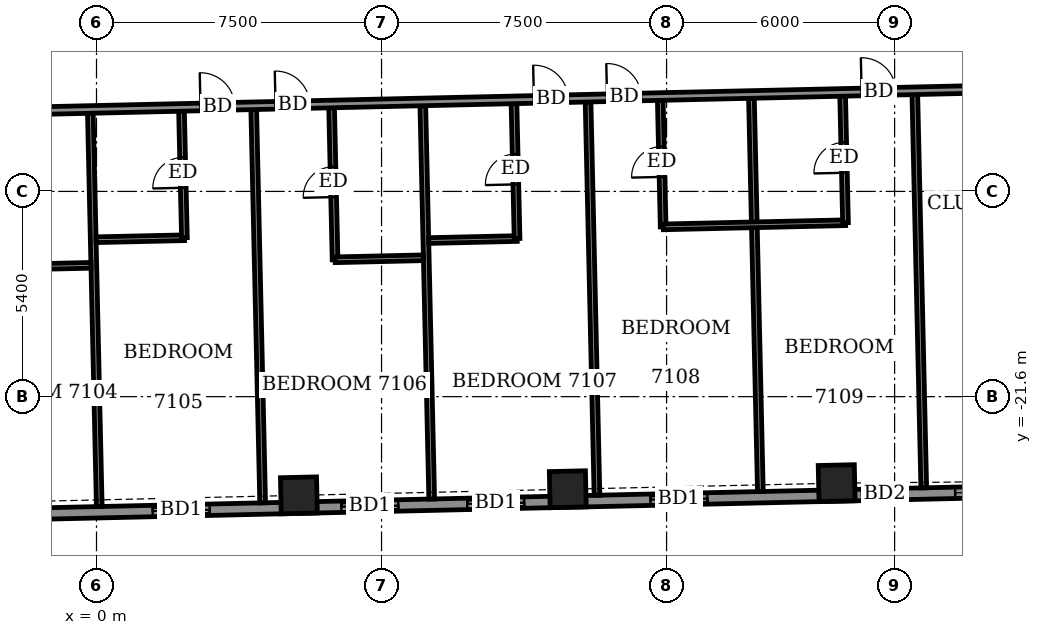
"""IFC4 building model, lengths in metres.
Left out: names, types, materials, properties, quantities, classifications, styles, units other than length and angle.
Written with IfcOpenShell. Run it as: python <this file> out.ifc"""

import sys

from ifc_helpers import new_model, si_unit, direction, frame, frame_2d, origin, origin_2d, place, context, subcontext, project, spatial, rectangle, extrude, element, fill, save


model = new_model("IFC4")
c1 = context("Model", 3, precision=1e-05, world=origin(), true_north=direction((0.0, 1.0)))
c2 = subcontext(c1, "Body", "Model", "MODEL_VIEW")
j1 = project(units=[si_unit("LENGTHUNIT", "METRE"), si_unit("PLANEANGLEUNIT", "RADIAN")], contexts=[c1])
p1 = place(None, origin())
s1 = spatial("IfcSite", under=j1, at=p1, CompositionType="ELEMENT")
p2 = place(p1, origin())
s2 = spatial("IfcBuilding", under=s1, at=p2, CompositionType="ELEMENT")
p3 = place(p2, frame((0.0, 0.0, 279.9)))
s3 = spatial("IfcBuildingStorey", under=s2, at=p3, CompositionType="ELEMENT", Elevation=279.9)
for number, where, z_axis, x_axis in (
    (1, (5.325, -24.197, -0.55), (0.0, 0.0, 1.0), (1.0, 0.023, 0.0)),
    (2, (12.4, -24.036, -0.55), (0.0, 0.0, 1.0), (1.0, 0.023, 0.0)),
    (3, (19.475, -23.876, -0.55), (0.0, 0.0, 1.0), (1.0, 0.023, 0.0)),
):
    element("IfcColumn", number, at=place(p3, frame(where, z_axis=z_axis, x_axis=x_axis)), inside=s3, PredefinedType="COLUMN", context=c2, shape_type="SweptSolid", body=[
        extrude(rectangle(XDim=0.95, YDim=0.95, at=origin_2d()), origin(), (0.0, 0.0, 1.0), 3.6),
    ])
p4 = place(p3, frame((-22.816, -25.161, 0.0), z_axis=(0.0, 0.0, 1.0), x_axis=(0.999742646411, 0.022685699159, 0.0)))
e4 = element("IfcWall", 4, at=p4, inside=s3, PredefinedType="SOLIDWALL", context=c2, shape_type="SweptSolid", body=[
    extrude(rectangle(XDim=49.236, YDim=0.3, at=frame_2d((24.618, 0.0))), origin(), (0.0, 0.0, 1.0), 2.5),
])
p5 = place(p4, frame((2.277, 0.0, 0.0)))
e5 = element("IfcOpeningElement", 5, at=p5, cuts=e4, PredefinedType="OPENING", context=c2, shape_type="SweptSolid", body=[
    extrude(rectangle(XDim=1.5, YDim=2.4, at=frame_2d((0.75, 1.2))), frame((0.0, 0.16, 0.0), z_axis=(0.0, -1.0, 0.0), x_axis=(1.0, 0.0, 0.0)), (0.0, 0.0, 1.0), 0.32),
])
p6 = place(p4, frame((7.726, 0.0, 0.0)))
e6 = element("IfcOpeningElement", 6, at=p6, cuts=e4, PredefinedType="OPENING", context=c2, shape_type="SweptSolid", body=[
    extrude(rectangle(XDim=1.5, YDim=2.4, at=frame_2d((0.75, 1.2))), frame((0.0, 0.16, 0.0), z_axis=(0.0, -1.0, 0.0), x_axis=(1.0, 0.0, 0.0)), (0.0, 0.0, 1.0), 0.32),
])
p7 = place(p4, frame((11.039, 0.0, 0.0)))
e7 = element("IfcOpeningElement", 7, at=p7, cuts=e4, PredefinedType="OPENING", context=c2, shape_type="SweptSolid", body=[
    extrude(rectangle(XDim=1.5, YDim=2.4, at=frame_2d((0.75, 1.2))), frame((0.0, 0.16, 0.0), z_axis=(0.0, -1.0, 0.0), x_axis=(1.0, 0.0, 0.0)), (0.0, 0.0, 1.0), 0.32),
])
p8 = place(p4, frame((15.589, 0.0, 0.0)))
e8 = element("IfcOpeningElement", 8, at=p8, cuts=e4, PredefinedType="OPENING", context=c2, shape_type="SweptSolid", body=[
    extrude(rectangle(XDim=1.5, YDim=2.4, at=frame_2d((0.75, 1.2))), frame((0.0, 0.16, 0.0), z_axis=(0.0, -1.0, 0.0), x_axis=(1.0, 0.0, 0.0)), (0.0, 0.0, 1.0), 0.32),
])
p9 = place(p4, frame((18.903, 0.0, 0.0)))
e9 = element("IfcOpeningElement", 9, at=p9, cuts=e4, PredefinedType="OPENING", context=c2, shape_type="SweptSolid", body=[
    extrude(rectangle(XDim=1.5, YDim=2.4, at=frame_2d((0.75, 1.2))), frame((0.0, 0.16, 0.0), z_axis=(0.0, -1.0, 0.0), x_axis=(1.0, 0.0, 0.0)), (0.0, 0.0, 1.0), 0.32),
])
p10 = place(p4, frame((24.3, 0.0, 0.0)))
e10 = element("IfcOpeningElement", 10, at=p10, cuts=e4, PredefinedType="OPENING", context=c2, shape_type="SweptSolid", body=[
    extrude(rectangle(XDim=1.5, YDim=2.4, at=frame_2d((0.75, 1.2))), frame((0.0, 0.16, 0.0), z_axis=(0.0, -1.0, 0.0), x_axis=(1.0, 0.0, 0.0)), (0.0, 0.0, 1.0), 0.32),
])
p11 = place(p4, frame((29.265, 0.0, 0.0)))
e11 = element("IfcOpeningElement", 11, at=p11, cuts=e4, PredefinedType="OPENING", context=c2, shape_type="SweptSolid", body=[
    extrude(rectangle(XDim=1.5, YDim=2.4, at=frame_2d((0.75, 1.2))), frame((0.0, 0.16, 0.0), z_axis=(0.0, -1.0, 0.0), x_axis=(1.0, 0.0, 0.0)), (0.0, 0.0, 1.0), 0.32),
])
p12 = place(p4, frame((32.579, 0.0, 0.0)))
e12 = element("IfcOpeningElement", 12, at=p12, cuts=e4, PredefinedType="OPENING", context=c2, shape_type="SweptSolid", body=[
    extrude(rectangle(XDim=1.5, YDim=2.4, at=frame_2d((0.75, 1.2))), frame((0.0, 0.16, 0.0), z_axis=(0.0, -1.0, 0.0), x_axis=(1.0, 0.0, 0.0)), (0.0, 0.0, 1.0), 0.32),
])
p13 = place(p4, frame((37.4, 0.0, 0.0)))
e13 = element("IfcOpeningElement", 13, at=p13, cuts=e4, PredefinedType="OPENING", context=c2, shape_type="SweptSolid", body=[
    extrude(rectangle(XDim=1.5, YDim=2.4, at=frame_2d((0.75, 1.2))), frame((0.0, 0.16, 0.0), z_axis=(0.0, -1.0, 0.0), x_axis=(1.0, 0.0, 0.0)), (0.0, 0.0, 1.0), 0.32),
])
p14 = place(p4, frame((42.967, 0.0, 0.0)))
e14 = element("IfcOpeningElement", 14, at=p14, cuts=e4, PredefinedType="OPENING", context=c2, shape_type="SweptSolid", body=[
    extrude(rectangle(XDim=1.2, YDim=2.4, at=frame_2d((0.6, 1.2))), frame((0.0, 0.16, 0.0), z_axis=(0.0, -1.0, 0.0), x_axis=(1.0, 0.0, 0.0)), (0.0, 0.0, 1.0), 0.32),
])
p15 = place(p4, frame((45.421, 0.0, 0.9)))
e15 = element("IfcOpeningElement", 15, at=p15, cuts=e4, PredefinedType="OPENING", context=c2, shape_type="SweptSolid", body=[
    extrude(rectangle(XDim=2.4, YDim=1.5, at=frame_2d((1.2, 0.75))), frame((0.0, 0.16, 0.0), z_axis=(0.0, -1.0, 0.0), x_axis=(1.0, 0.0, 0.0)), (0.0, 0.0, 1.0), 0.32),
])
p16 = place(p3, frame((0.073, -24.492, 0.0), z_axis=(0.0, 0.0, 1.0), x_axis=(-0.022714440015, 0.999741993824, 0.0)))
e16 = element("IfcWall", 16, at=p16, inside=s3, PredefinedType="PARTITIONING", context=c2, shape_type="SweptSolid", body=[
    extrude(rectangle(XDim=10.351, YDim=0.15, at=frame_2d((5.175, 0.0))), origin(), (0.0, 0.0, 1.0), 2.5),
])
p17 = place(p3, frame((4.372, -24.394, 0.0), z_axis=(0.0, 0.0, 1.0), x_axis=(-0.022713904397, 0.999742005993, 0.0)))
e17 = element("IfcWall", 17, at=p17, inside=s3, PredefinedType="PARTITIONING", context=c2, shape_type="SweptSolid", body=[
    extrude(rectangle(XDim=10.351, YDim=0.15, at=frame_2d((5.175, 0.0))), origin(), (0.0, 0.0, 1.0), 2.5),
])
p18 = place(p3, frame((8.82, -24.293, 0.0), z_axis=(0.0, 0.0, 1.0), x_axis=(-0.022622273571, 0.999744083623, 0.0)))
e18 = element("IfcWall", 18, at=p18, inside=s3, PredefinedType="PARTITIONING", context=c2, shape_type="SweptSolid", body=[
    extrude(rectangle(XDim=10.35, YDim=0.15, at=frame_2d((5.175, 0.0))), origin(), (0.0, 0.0, 1.0), 2.5),
])
p19 = place(p3, frame((13.169, -24.194, 0.0), z_axis=(0.0, 0.0, 1.0), x_axis=(-0.022692470342, 0.99974249274, 0.0)))
e19 = element("IfcWall", 19, at=p19, inside=s3, PredefinedType="PARTITIONING", context=c2, shape_type="SweptSolid", body=[
    extrude(rectangle(XDim=10.35, YDim=0.15, at=frame_2d((5.175, 0.0))), origin(), (0.0, 0.0, 1.0), 2.5),
])
p20 = place(p3, frame((17.468, -24.097, 0.0), z_axis=(0.0, 0.0, 1.0), x_axis=(-0.022714440015, 0.999741993824, 0.0)))
e20 = element("IfcWall", 20, at=p20, inside=s3, PredefinedType="PARTITIONING", context=c2, shape_type="SweptSolid", body=[
    extrude(rectangle(XDim=10.351, YDim=0.15, at=frame_2d((5.175, 0.0))), origin(), (0.0, 0.0, 1.0), 2.5),
])
p21 = place(p3, frame((21.767, -23.999, 0.0), z_axis=(0.0, 0.0, 1.0), x_axis=(-0.022716582742, 0.999741945138, 0.0)))
e21 = element("IfcWall", 21, at=p21, inside=s3, PredefinedType="PARTITIONING", context=c2, shape_type="SweptSolid", body=[
    extrude(rectangle(XDim=10.35, YDim=0.15, at=frame_2d((5.175, 0.0))), origin(), (0.0, 0.0, 1.0), 2.55),
])
p22 = place(p3, frame((-2.469, -18.197, 0.0), z_axis=(0.0, 0.0, 1.0), x_axis=(0.999749954681, 0.022361308448, 0.0)))
e22 = element("IfcWall", 22, at=p22, inside=s3, PredefinedType="PARTITIONING", context=c2, shape_type="SweptSolid", body=[
    extrude(rectangle(XDim=2.325, YDim=0.15, at=frame_2d((1.163, 0.0))), origin(), (0.0, 0.0, 1.0), 3.05),
])
p23 = place(p3, frame((6.277, -17.999, 0.0), z_axis=(0.0, 0.0, 1.0), x_axis=(-0.022765770952, 0.999740826251, 0.0)))
e23 = element("IfcWall", 23, at=p23, inside=s3, PredefinedType="PARTITIONING", context=c2, shape_type="SweptSolid", body=[
    extrude(rectangle(XDim=4.0, YDim=0.15, at=frame_2d((2.0, 0.0))), origin(), (0.0, 0.0, 1.0), 3.05),
])
p24 = place(p23, frame((1.65, 0.0, 0.0)))
e24 = element("IfcOpeningElement", 24, at=p24, cuts=e23, PredefinedType="OPENING", context=c2, shape_type="SweptSolid", body=[
    extrude(rectangle(XDim=0.8, YDim=2.1, at=frame_2d((0.4, 1.05))), frame((0.0, 0.085, 0.0), z_axis=(0.0, -1.0, 0.0), x_axis=(1.0, 0.0, 0.0)), (0.0, 0.0, 1.0), 0.17),
])
p25 = place(p3, frame((6.279, -17.999, 0.0), z_axis=(0.0, 0.0, 1.0), x_axis=(0.999740260747, 0.02279059109, 0.0)))
e25 = element("IfcWall", 25, at=p25, inside=s3, PredefinedType="PARTITIONING", context=c2, shape_type="SweptSolid", body=[
    extrude(rectangle(XDim=2.324, YDim=0.15, at=frame_2d((1.162, 0.0))), origin(), (0.0, 0.0, 1.0), 3.05),
])
p26 = place(p3, frame((8.743, -17.493, 0.0), z_axis=(0.0, 0.0, 1.0), x_axis=(0.99974053329, 0.022778632478, 0.0)))
e26 = element("IfcWall", 26, at=p26, inside=s3, PredefinedType="PARTITIONING", context=c2, shape_type="SweptSolid", body=[
    extrude(rectangle(XDim=2.326, YDim=0.15, at=frame_2d((1.163, 0.0))), origin(), (0.0, 0.0, 1.0), 3.05),
])
p27 = place(p3, frame((11.066, -17.44, 0.0), z_axis=(0.0, 0.0, 1.0), x_axis=(-0.022765149847, 0.999740840394, 0.0)))
e27 = element("IfcWall", 27, at=p27, inside=s3, PredefinedType="PARTITIONING", context=c2, shape_type="SweptSolid", body=[
    extrude(rectangle(XDim=3.55, YDim=0.15, at=frame_2d((1.775, 0.0))), origin(), (0.0, 0.0, 1.0), 3.05),
])
p28 = place(p27, frame((1.425, 0.0, 0.0)))
e28 = element("IfcOpeningElement", 28, at=p28, cuts=e27, PredefinedType="OPENING", context=c2, shape_type="SweptSolid", body=[
    extrude(rectangle(XDim=0.8, YDim=2.1, at=frame_2d((0.4, 1.05))), frame((0.0, 0.085, 0.0), z_axis=(0.0, -1.0, 0.0), x_axis=(1.0, 0.0, 0.0)), (0.0, 0.0, 1.0), 0.17),
])
p29 = place(p3, frame((-0.01, -17.471, 0.0), z_axis=(0.0, 0.0, 1.0), x_axis=(0.999749954681, 0.022361308448, 0.0)))
e29 = element("IfcWall", 29, at=p29, inside=s3, PredefinedType="PARTITIONING", context=c2, shape_type="SweptSolid", body=[
    extrude(rectangle(XDim=2.325, YDim=0.15, at=frame_2d((1.163, 0.0))), origin(), (0.0, 0.0, 1.0), 3.05),
])
p30 = place(p3, frame((2.313, -17.419, 0.0), z_axis=(0.0, 0.0, 1.0), x_axis=(-0.02280301672, 0.999739977408, 0.0)))
e30 = element("IfcWall", 30, at=p30, inside=s3, PredefinedType="PARTITIONING", context=c2, shape_type="SweptSolid", body=[
    extrude(rectangle(XDim=3.33, YDim=0.15, at=frame_2d((1.665, 0.0))), origin(), (0.0, 0.0, 1.0), 3.05),
])
p31 = place(p30, frame((1.315, 0.0, 0.0)))
e31 = element("IfcOpeningElement", 31, at=p31, cuts=e30, PredefinedType="OPENING", context=c2, shape_type="SweptSolid", body=[
    extrude(rectangle(XDim=0.8, YDim=2.1, at=frame_2d((0.4, 1.05))), frame((0.0, 0.085, 0.0), z_axis=(0.0, -1.0, 0.0), x_axis=(1.0, 0.0, 0.0)), (0.0, 0.0, 1.0), 0.17),
])
p32 = place(p3, frame((14.91, -17.133, 0.0), z_axis=(0.0, 0.0, 1.0), x_axis=(-0.022801345323, 0.99974001553, 0.0)))
e32 = element("IfcWall", 32, at=p32, inside=s3, PredefinedType="PARTITIONING", context=c2, shape_type="SweptSolid", body=[
    extrude(rectangle(XDim=3.33, YDim=0.15, at=frame_2d((1.665, 0.0))), origin(), (0.0, 0.0, 1.0), 3.05),
])
p33 = place(p32, frame((1.315, 0.0, 0.0)))
e33 = element("IfcOpeningElement", 33, at=p33, cuts=e32, PredefinedType="OPENING", context=c2, shape_type="SweptSolid", body=[
    extrude(rectangle(XDim=0.8, YDim=2.1, at=frame_2d((0.4, 1.05))), frame((0.0, 0.085, 0.0), z_axis=(0.0, -1.0, 0.0), x_axis=(1.0, 0.0, 0.0)), (0.0, 0.0, 1.0), 0.17),
])
p34 = place(p3, frame((14.912, -17.133, 0.0), z_axis=(0.0, 0.0, 1.0), x_axis=(0.999741415159, 0.022739894798, 0.0)))
e34 = element("IfcWall", 34, at=p34, inside=s3, PredefinedType="PARTITIONING", context=c2, shape_type="SweptSolid", body=[
    extrude(rectangle(XDim=4.799, YDim=0.15, at=frame_2d((2.399, 0.0))), origin(), (0.0, 0.0, 1.0), 3.05),
])
p35 = place(p3, frame((19.708, -17.024, 0.0), z_axis=(0.0, 0.0, 1.0), x_axis=(-0.022509879905, 0.999746620553, 0.0)))
e35 = element("IfcWall", 35, at=p35, inside=s3, PredefinedType="PARTITIONING", context=c2, shape_type="SweptSolid", body=[
    extrude(rectangle(XDim=3.33, YDim=0.15, at=frame_2d((1.665, 0.0))), origin(), (0.0, 0.0, 1.0), 3.05),
])
p36 = place(p35, frame((1.315, 0.0, 0.0)))
e36 = element("IfcOpeningElement", 36, at=p36, cuts=e35, PredefinedType="OPENING", context=c2, shape_type="SweptSolid", body=[
    extrude(rectangle(XDim=0.8, YDim=2.1, at=frame_2d((0.4, 1.05))), frame((0.0, 0.085, 0.0), z_axis=(0.0, -1.0, 0.0), x_axis=(1.0, 0.0, 0.0)), (0.0, 0.0, 1.0), 0.17),
])
p37 = place(p3, frame((-25.731, -14.624, 0.0), z_axis=(0.0, 0.0, 1.0), x_axis=(0.999742799525, 0.022678950563, 0.0)))
e37 = element("IfcWall", 37, at=p37, inside=s3, PredefinedType="PARTITIONING", context=c2, shape_type="SweptSolid", body=[
    extrude(rectangle(XDim=55.386, YDim=0.2, at=frame_2d((27.693, 0.0))), origin(), (0.0, 0.0, 1.0), 3.05),
])
p38 = place(p37, frame((3.149, 0.0, 0.0)))
e38 = element("IfcOpeningElement", 38, at=p38, cuts=e37, PredefinedType="OPENING", context=c2, shape_type="SweptSolid", body=[
    extrude(rectangle(XDim=1.0, YDim=2.1, at=frame_2d((0.5, 1.05))), frame((0.0, 0.11, 0.0), z_axis=(0.0, -1.0, 0.0), x_axis=(1.0, 0.0, 0.0)), (0.0, 0.0, 1.0), 0.22),
])
p39 = place(p37, frame((11.1, 0.0, 0.0)))
e39 = element("IfcOpeningElement", 39, at=p39, cuts=e37, PredefinedType="OPENING", context=c2, shape_type="SweptSolid", body=[
    extrude(rectangle(XDim=0.9, YDim=2.1, at=frame_2d((0.45, 1.05))), frame((0.0, 0.11, 0.0), z_axis=(0.0, -1.0, 0.0), x_axis=(1.0, 0.0, 0.0)), (0.0, 0.0, 1.0), 0.22),
])
p40 = place(p37, frame((12.95, 0.0, 0.0)))
e40 = element("IfcOpeningElement", 40, at=p40, cuts=e37, PredefinedType="OPENING", context=c2, shape_type="SweptSolid", body=[
    extrude(rectangle(XDim=0.9, YDim=2.1, at=frame_2d((0.45, 1.05))), frame((0.0, 0.11, 0.0), z_axis=(0.0, -1.0, 0.0), x_axis=(1.0, 0.0, 0.0)), (0.0, 0.0, 1.0), 0.22),
])
p41 = place(p37, frame((19.675, 0.0, 0.0)))
e41 = element("IfcOpeningElement", 41, at=p41, cuts=e37, PredefinedType="OPENING", context=c2, shape_type="SweptSolid", body=[
    extrude(rectangle(XDim=0.9, YDim=2.1, at=frame_2d((0.45, 1.05))), frame((0.0, 0.11, 0.0), z_axis=(0.0, -1.0, 0.0), x_axis=(1.0, 0.0, 0.0)), (0.0, 0.0, 1.0), 0.22),
])
p42 = place(p37, frame((21.7, 0.0, 0.0)))
e42 = element("IfcOpeningElement", 42, at=p42, cuts=e37, PredefinedType="OPENING", context=c2, shape_type="SweptSolid", body=[
    extrude(rectangle(XDim=0.9, YDim=2.1, at=frame_2d((0.45, 1.05))), frame((0.0, 0.11, 0.0), z_axis=(0.0, -1.0, 0.0), x_axis=(1.0, 0.0, 0.0)), (0.0, 0.0, 1.0), 0.22),
])
p43 = place(p37, frame((28.475, 0.0, 0.0)))
e43 = element("IfcOpeningElement", 43, at=p43, cuts=e37, PredefinedType="OPENING", context=c2, shape_type="SweptSolid", body=[
    extrude(rectangle(XDim=0.9, YDim=2.1, at=frame_2d((0.45, 1.05))), frame((0.0, 0.11, 0.0), z_axis=(0.0, -1.0, 0.0), x_axis=(1.0, 0.0, 0.0)), (0.0, 0.0, 1.0), 0.22),
])
p44 = place(p37, frame((30.45, 0.0, 0.0)))
e44 = element("IfcOpeningElement", 44, at=p44, cuts=e37, PredefinedType="OPENING", context=c2, shape_type="SweptSolid", body=[
    extrude(rectangle(XDim=0.9, YDim=2.1, at=frame_2d((0.45, 1.05))), frame((0.0, 0.11, 0.0), z_axis=(0.0, -1.0, 0.0), x_axis=(1.0, 0.0, 0.0)), (0.0, 0.0, 1.0), 0.22),
])
p45 = place(p37, frame((37.25, 0.0, 0.0)))
e45 = element("IfcOpeningElement", 45, at=p45, cuts=e37, PredefinedType="OPENING", context=c2, shape_type="SweptSolid", body=[
    extrude(rectangle(XDim=0.9, YDim=2.1, at=frame_2d((0.45, 1.05))), frame((0.0, 0.11, 0.0), z_axis=(0.0, -1.0, 0.0), x_axis=(1.0, 0.0, 0.0)), (0.0, 0.0, 1.0), 0.22),
])
p46 = place(p37, frame((39.175, 0.0, 0.0)))
e46 = element("IfcOpeningElement", 46, at=p46, cuts=e37, PredefinedType="OPENING", context=c2, shape_type="SweptSolid", body=[
    extrude(rectangle(XDim=0.9, YDim=2.1, at=frame_2d((0.45, 1.05))), frame((0.0, 0.11, 0.0), z_axis=(0.0, -1.0, 0.0), x_axis=(1.0, 0.0, 0.0)), (0.0, 0.0, 1.0), 0.22),
])
p47 = place(p37, frame((45.875, 0.0, 0.0)))
e47 = element("IfcOpeningElement", 47, at=p47, cuts=e37, PredefinedType="OPENING", context=c2, shape_type="SweptSolid", body=[
    extrude(rectangle(XDim=0.9, YDim=2.1, at=frame_2d((0.45, 1.05))), frame((0.0, 0.11, 0.0), z_axis=(0.0, -1.0, 0.0), x_axis=(1.0, 0.0, 0.0)), (0.0, 0.0, 1.0), 0.22),
])
p48 = place(p37, frame((51.127, 0.0, 0.0)))
e48 = element("IfcOpeningElement", 48, at=p48, cuts=e37, PredefinedType="OPENING", context=c2, shape_type="SweptSolid", body=[
    extrude(rectangle(XDim=1.0, YDim=2.1, at=frame_2d((0.5, 1.05))), frame((0.0, 0.11, 0.0), z_axis=(0.0, -1.0, 0.0), x_axis=(1.0, 0.0, 0.0)), (0.0, 0.0, 1.0), 0.22),
])
p49 = place(p10, origin())
e49 = element("IfcDoor", 49, at=p49, inside=s3, OperationType="SLIDING_TO_LEFT", PredefinedType="DOOR", context=c2, shape_type="SweptSolid", body=[
    extrude(rectangle(XDim=1.5, YDim=2.4, at=frame_2d((0.75, 1.2))), frame((0.0, 0.025, 0.0), z_axis=(0.0, -1.0, 0.0), x_axis=(1.0, 0.0, 0.0)), (0.0, 0.0, 1.0), 0.05),
])
fill(e10, e49)
p50 = place(p11, origin())
e50 = element("IfcDoor", 50, at=p50, inside=s3, OperationType="SLIDING_TO_LEFT", PredefinedType="DOOR", context=c2, shape_type="SweptSolid", body=[
    extrude(rectangle(XDim=1.5, YDim=2.4, at=frame_2d((0.75, 1.2))), frame((0.0, 0.025, 0.0), z_axis=(0.0, -1.0, 0.0), x_axis=(1.0, 0.0, 0.0)), (0.0, 0.0, 1.0), 0.05),
])
fill(e11, e50)
p51 = place(p12, origin())
e51 = element("IfcDoor", 51, at=p51, inside=s3, OperationType="SLIDING_TO_LEFT", PredefinedType="DOOR", context=c2, shape_type="SweptSolid", body=[
    extrude(rectangle(XDim=1.5, YDim=2.4, at=frame_2d((0.75, 1.2))), frame((0.0, 0.025, 0.0), z_axis=(0.0, -1.0, 0.0), x_axis=(1.0, 0.0, 0.0)), (0.0, 0.0, 1.0), 0.05),
])
fill(e12, e51)
p52 = place(p13, origin())
e52 = element("IfcDoor", 52, at=p52, inside=s3, OperationType="SLIDING_TO_LEFT", PredefinedType="DOOR", context=c2, shape_type="SweptSolid", body=[
    extrude(rectangle(XDim=1.5, YDim=2.4, at=frame_2d((0.75, 1.2))), frame((0.0, 0.025, 0.0), z_axis=(0.0, -1.0, 0.0), x_axis=(1.0, 0.0, 0.0)), (0.0, 0.0, 1.0), 0.05),
])
fill(e13, e52)
p53 = place(p14, origin())
e53 = element("IfcDoor", 53, at=p53, inside=s3, OperationType="SLIDING_TO_LEFT", PredefinedType="DOOR", context=c2, shape_type="SweptSolid", body=[
    extrude(rectangle(XDim=1.2, YDim=2.4, at=frame_2d((0.6, 1.2))), frame((0.0, 0.025, 0.0), z_axis=(0.0, -1.0, 0.0), x_axis=(1.0, 0.0, 0.0)), (0.0, 0.0, 1.0), 0.05),
])
fill(e14, e53)
p54 = place(p15, origin())
e54 = element("IfcWindow", 54, at=p54, inside=s3, PartitioningType="DOUBLE_PANEL_VERTICAL", PredefinedType="WINDOW", context=c2, shape_type="SweptSolid", body=[
    extrude(rectangle(XDim=2.4, YDim=1.5, at=frame_2d((1.2, 0.75))), frame((0.0, 0.03, 0.0), z_axis=(0.0, -1.0, 0.0), x_axis=(1.0, 0.0, 0.0)), (0.0, 0.0, 1.0), 0.06),
])
fill(e15, e54)
p55 = place(p43, origin())
e55 = element("IfcDoor", 55, at=p55, inside=s3, OperationType="SINGLE_SWING_LEFT", PredefinedType="DOOR", context=c2, shape_type="SweptSolid", body=[
    extrude(rectangle(XDim=0.9, YDim=2.1, at=frame_2d((0.45, 1.05))), frame((0.0, 0.025, 0.0), z_axis=(0.0, -1.0, 0.0), x_axis=(1.0, 0.0, 0.0)), (0.0, 0.0, 1.0), 0.05),
])
fill(e43, e55)
p56 = place(p31, origin())
e56 = element("IfcDoor", 56, at=p56, inside=s3, OperationType="SINGLE_SWING_LEFT", PredefinedType="DOOR", context=c2, shape_type="SweptSolid", body=[
    extrude(rectangle(XDim=0.8, YDim=2.1, at=frame_2d((0.4, 1.05))), frame((0.0, 0.025, 0.0), z_axis=(0.0, -1.0, 0.0), x_axis=(1.0, 0.0, 0.0)), (0.0, 0.0, 1.0), 0.05),
])
fill(e31, e56)
p57 = place(p44, origin())
e57 = element("IfcDoor", 57, at=p57, inside=s3, OperationType="SINGLE_SWING_RIGHT", PredefinedType="DOOR", context=c2, shape_type="SweptSolid", body=[
    extrude(rectangle(XDim=0.9, YDim=2.1, at=frame_2d((0.45, 1.05))), frame((0.0, 0.025, 0.0), z_axis=(0.0, -1.0, 0.0), x_axis=(1.0, 0.0, 0.0)), (0.0, 0.0, 1.0), 0.05),
])
fill(e44, e57)
p58 = place(p24, origin())
e58 = element("IfcDoor", 58, at=p58, inside=s3, OperationType="SINGLE_SWING_RIGHT", PredefinedType="DOOR", context=c2, shape_type="SweptSolid", body=[
    extrude(rectangle(XDim=0.8, YDim=2.1, at=frame_2d((0.4, 1.05))), frame((0.0, 0.025, 0.0), z_axis=(0.0, -1.0, 0.0), x_axis=(1.0, 0.0, 0.0)), (0.0, 0.0, 1.0), 0.05),
])
fill(e24, e58)
p59 = place(p45, origin())
e59 = element("IfcDoor", 59, at=p59, inside=s3, OperationType="SINGLE_SWING_LEFT", PredefinedType="DOOR", context=c2, shape_type="SweptSolid", body=[
    extrude(rectangle(XDim=0.9, YDim=2.1, at=frame_2d((0.45, 1.05))), frame((0.0, 0.025, 0.0), z_axis=(0.0, -1.0, 0.0), x_axis=(1.0, 0.0, 0.0)), (0.0, 0.0, 1.0), 0.05),
])
fill(e45, e59)
p60 = place(p28, origin())
e60 = element("IfcDoor", 60, at=p60, inside=s3, OperationType="SINGLE_SWING_LEFT", PredefinedType="DOOR", context=c2, shape_type="SweptSolid", body=[
    extrude(rectangle(XDim=0.8, YDim=2.1, at=frame_2d((0.4, 1.05))), frame((0.0, 0.025, 0.0), z_axis=(0.0, -1.0, 0.0), x_axis=(1.0, 0.0, 0.0)), (0.0, 0.0, 1.0), 0.05),
])
fill(e28, e60)
p61 = place(p46, origin())
e61 = element("IfcDoor", 61, at=p61, inside=s3, OperationType="SINGLE_SWING_RIGHT", PredefinedType="DOOR", context=c2, shape_type="SweptSolid", body=[
    extrude(rectangle(XDim=0.9, YDim=2.1, at=frame_2d((0.45, 1.05))), frame((0.0, 0.025, 0.0), z_axis=(0.0, -1.0, 0.0), x_axis=(1.0, 0.0, 0.0)), (0.0, 0.0, 1.0), 0.05),
])
fill(e46, e61)
p62 = place(p33, origin())
e62 = element("IfcDoor", 62, at=p62, inside=s3, OperationType="SINGLE_SWING_RIGHT", PredefinedType="DOOR", context=c2, shape_type="SweptSolid", body=[
    extrude(rectangle(XDim=0.8, YDim=2.1, at=frame_2d((0.4, 1.05))), frame((0.0, 0.025, 0.0), z_axis=(0.0, -1.0, 0.0), x_axis=(1.0, 0.0, 0.0)), (0.0, 0.0, 1.0), 0.05),
])
fill(e33, e62)
p63 = place(p47, origin())
e63 = element("IfcDoor", 63, at=p63, inside=s3, OperationType="SINGLE_SWING_LEFT", PredefinedType="DOOR", context=c2, shape_type="SweptSolid", body=[
    extrude(rectangle(XDim=0.9, YDim=2.1, at=frame_2d((0.45, 1.05))), frame((0.0, 0.025, 0.0), z_axis=(0.0, -1.0, 0.0), x_axis=(1.0, 0.0, 0.0)), (0.0, 0.0, 1.0), 0.05),
])
fill(e47, e63)
p64 = place(p36, origin())
e64 = element("IfcDoor", 64, at=p64, inside=s3, OperationType="SINGLE_SWING_LEFT", PredefinedType="DOOR", context=c2, shape_type="SweptSolid", body=[
    extrude(rectangle(XDim=0.8, YDim=2.1, at=frame_2d((0.4, 1.05))), frame((0.0, 0.025, 0.0), z_axis=(0.0, -1.0, 0.0), x_axis=(1.0, 0.0, 0.0)), (0.0, 0.0, 1.0), 0.05),
])
fill(e36, e64)
save(model, sys.argv[1])
